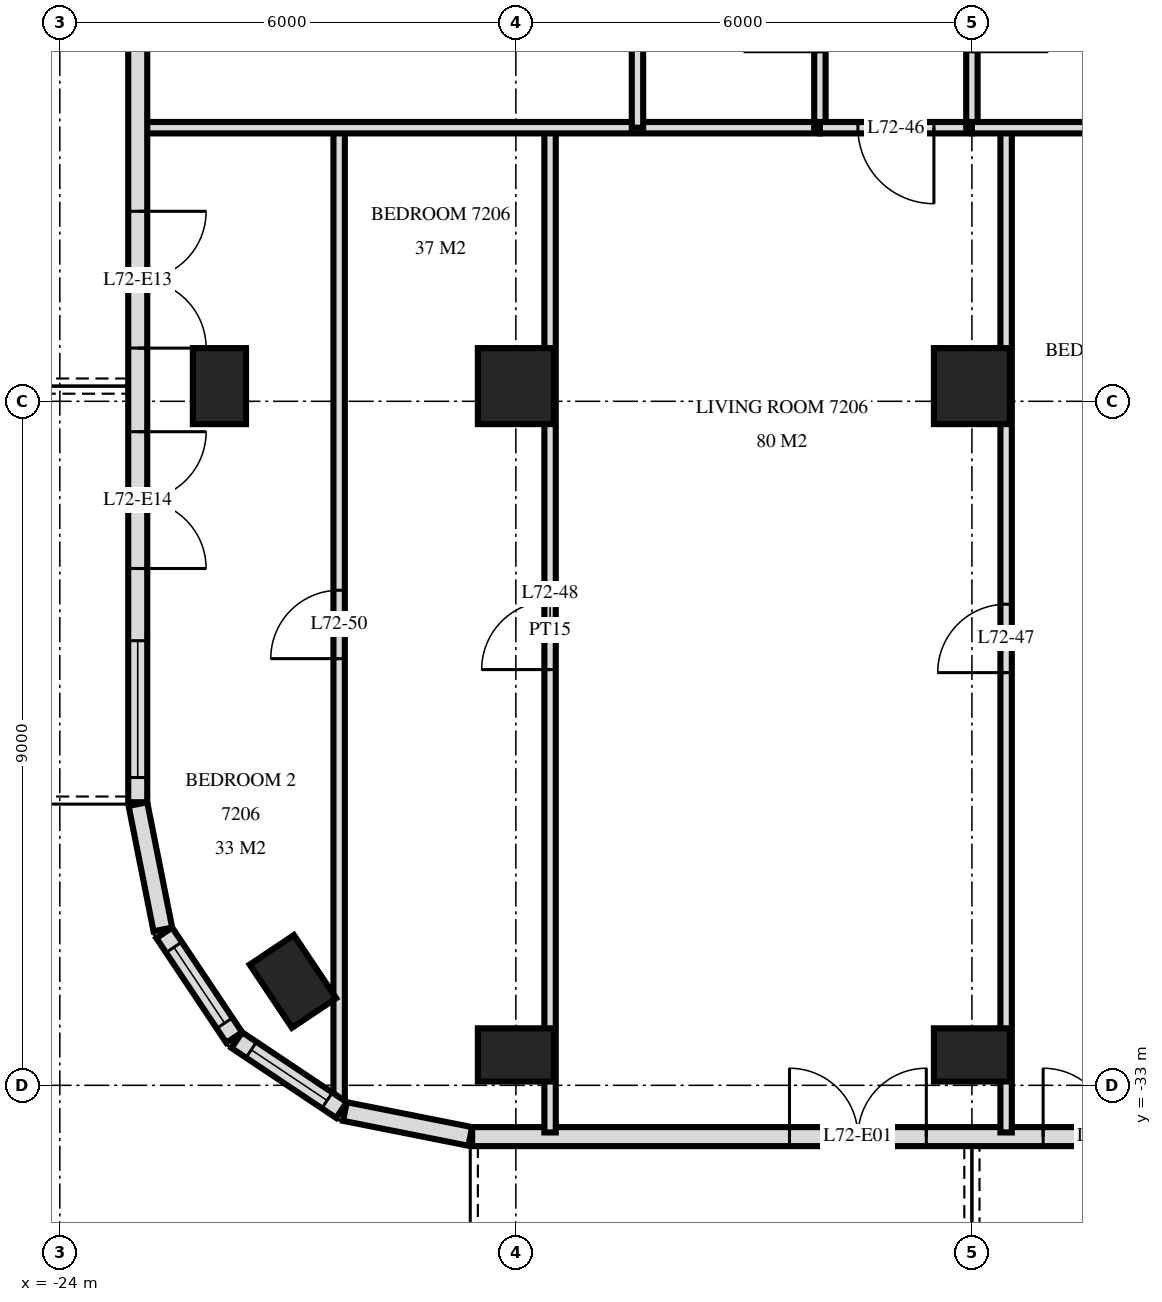
"""IFC4 building model, lengths in metres.
Left out: names, types, materials, properties, quantities, classifications, styles, units other than length and angle.
Written with IfcOpenShell. Run it as: python <this file> out.ifc"""

import sys

from ifc_helpers import new_model, si_unit, direction, frame, frame_2d, origin, origin_2d, place, context, subcontext, project, spatial, rectangle, extrude, element, fill, save


model = new_model("IFC4")
c1 = context("Model", 3, precision=1e-05, world=origin(), true_north=direction((0.0, 1.0)))
c2 = subcontext(c1, "Body", "Model", "MODEL_VIEW")
j1 = project(units=[si_unit("LENGTHUNIT", "METRE"), si_unit("PLANEANGLEUNIT", "RADIAN")], contexts=[c1])
p1 = place(None, origin())
s1 = spatial("IfcSite", under=j1, at=p1, CompositionType="ELEMENT")
p2 = place(p1, origin())
s2 = spatial("IfcBuilding", under=s1, at=p2, CompositionType="ELEMENT")
p3 = place(p2, frame((0.0, 0.0, 273.6)))
s3 = spatial("IfcBuildingStorey", under=s2, at=p3, CompositionType="ELEMENT", Elevation=273.6)
for number, where, z_axis, x_axis in (
    (1, (-21.9, -23.8, 0.0), (0.0, 0.0, 1.0), (0.0, 1.0, 0.0)),
    (2, (-20.933, -31.633, 0.0), (0.0, 0.0, 1.0), (-0.556, 0.831, 0.0)),
    (3, (-18.0, -32.6, 0.0), (0.0, 0.0, 1.0), (1.0, 0.0, 0.0)),
):
    element("IfcColumn", number, at=place(p3, frame(where, z_axis=z_axis, x_axis=x_axis)), inside=s3, PredefinedType="COLUMN", context=c2, shape_type="SweptSolid", body=[
        extrude(rectangle(XDim=1.0, YDim=0.7, at=origin_2d()), origin(), (0.0, 0.0, 1.0), 3.5),
    ])
p4 = place(p3, frame((-18.0, -23.8, 0.0), z_axis=(0.0, 0.0, 1.0), x_axis=(1.0, 0.0, 0.0)))
e4 = element("IfcColumn", 4, at=p4, inside=s3, PredefinedType="COLUMN", context=c2, shape_type="SweptSolid", body=[
    extrude(rectangle(XDim=1.0, YDim=1.0, at=origin_2d()), origin(), (0.0, 0.0, 1.0), 3.5),
])
p5 = place(p3, frame((-12.0, -32.6, 0.0), z_axis=(0.0, 0.0, 1.0), x_axis=(1.0, 0.0, 0.0)))
e5 = element("IfcColumn", 5, at=p5, inside=s3, PredefinedType="COLUMN", context=c2, shape_type="SweptSolid", body=[
    extrude(rectangle(XDim=1.0, YDim=0.7, at=origin_2d()), origin(), (0.0, 0.0, 1.0), 3.5),
])
p6 = place(p3, frame((-12.0, -23.8, 0.0), z_axis=(0.0, 0.0, 1.0), x_axis=(1.0, 0.0, 0.0)))
e6 = element("IfcColumn", 6, at=p6, inside=s3, PredefinedType="COLUMN", context=c2, shape_type="SweptSolid", body=[
    extrude(rectangle(XDim=1.0, YDim=1.0, at=origin_2d()), origin(), (0.0, 0.0, 1.0), 3.5),
])
p7 = place(p3, frame((-22.975, -3.325, 0.0), z_axis=(0.0, 0.0, 1.0), x_axis=(0.0, -1.0, 0.0)))
e7 = element("IfcWall", 7, at=p7, inside=s3, PredefinedType="SOLIDWALL", context=c2, shape_type="SweptSolid", body=[
    extrude(rectangle(XDim=25.951, YDim=0.25, at=frame_2d((12.975, 0.0))), origin(), (0.0, 0.0, 1.0), 3.22),
])
p8 = place(p7, frame((3.225, 0.0, 0.0)))
e8 = element("IfcOpeningElement", 8, at=p8, cuts=e7, PredefinedType="OPENING", context=c2, shape_type="SweptSolid", body=[
    extrude(rectangle(XDim=1.8, YDim=2.4, at=frame_2d((0.9, 1.2))), frame((0.0, 0.135, 0.0), z_axis=(0.0, -1.0, 0.0), x_axis=(1.0, 0.0, 0.0)), (0.0, 0.0, 1.0), 0.27),
])
p9 = place(p7, frame((7.975, 0.0, 0.0)))
e9 = element("IfcOpeningElement", 9, at=p9, cuts=e7, PredefinedType="OPENING", context=c2, shape_type="SweptSolid", body=[
    extrude(rectangle(XDim=1.8, YDim=2.4, at=frame_2d((0.9, 1.2))), frame((0.0, 0.135, 0.0), z_axis=(0.0, -1.0, 0.0), x_axis=(1.0, 0.0, 0.0)), (0.0, 0.0, 1.0), 0.27),
])
p10 = place(p7, frame((12.275, 0.0, 0.9)))
e10 = element("IfcOpeningElement", 10, at=p10, cuts=e7, PredefinedType="OPENING", context=c2, shape_type="SweptSolid", body=[
    extrude(rectangle(XDim=1.2, YDim=1.5, at=frame_2d((0.6, 0.75))), frame((0.0, 0.135, 0.0), z_axis=(0.0, -1.0, 0.0), x_axis=(1.0, 0.0, 0.0)), (0.0, 0.0, 1.0), 0.27),
])
p11 = place(p7, frame((18.175, 0.0, 0.0)))
e11 = element("IfcOpeningElement", 11, at=p11, cuts=e7, PredefinedType="OPENING", context=c2, shape_type="SweptSolid", body=[
    extrude(rectangle(XDim=1.8, YDim=2.4, at=frame_2d((0.9, 1.2))), frame((0.0, 0.135, 0.0), z_axis=(0.0, -1.0, 0.0), x_axis=(1.0, 0.0, 0.0)), (0.0, 0.0, 1.0), 0.27),
])
p12 = place(p7, frame((21.075, 0.0, 0.0)))
e12 = element("IfcOpeningElement", 12, at=p12, cuts=e7, PredefinedType="OPENING", context=c2, shape_type="SweptSolid", body=[
    extrude(rectangle(XDim=1.8, YDim=2.4, at=frame_2d((0.9, 1.2))), frame((0.0, 0.135, 0.0), z_axis=(0.0, -1.0, 0.0), x_axis=(1.0, 0.0, 0.0)), (0.0, 0.0, 1.0), 0.27),
])
p13 = place(p7, frame((23.825, 0.0, 0.9)))
e13 = element("IfcOpeningElement", 13, at=p13, cuts=e7, PredefinedType="OPENING", context=c2, shape_type="SweptSolid", body=[
    extrude(rectangle(XDim=1.8, YDim=1.5, at=frame_2d((0.9, 0.75))), frame((0.0, 0.135, 0.0), z_axis=(0.0, -1.0, 0.0), x_axis=(1.0, 0.0, 0.0)), (0.0, 0.0, 1.0), 0.27),
])
p14 = place(p3, frame((-22.973, -29.3, 0.0), z_axis=(0.0, 0.0, 1.0), x_axis=(0.19513878023, -0.980775640221, 0.0)))
e14 = element("IfcWall", 14, at=p14, inside=s3, PredefinedType="SOLIDWALL", context=c2, shape_type="SweptSolid", body=[
    extrude(rectangle(XDim=1.681, YDim=0.25, at=frame_2d((0.841, 0.0))), origin(), (0.0, 0.0, 1.0), 3.22),
])
p15 = place(p3, frame((-22.626, -30.994, 0.0), z_axis=(0.0, 0.0, 1.0), x_axis=(0.55555029066, -0.831482937015, 0.0)))
e15 = element("IfcWall", 15, at=p15, inside=s3, PredefinedType="SOLIDWALL", context=c2, shape_type="SweptSolid", body=[
    extrude(rectangle(XDim=1.656, YDim=0.25, at=frame_2d((0.828, 0.0))), origin(), (0.0, 0.0, 1.0), 3.22),
])
p16 = place(p15, frame((0.228, 0.0, 0.9)))
e16 = element("IfcOpeningElement", 16, at=p16, cuts=e15, PredefinedType="OPENING", context=c2, shape_type="SweptSolid", body=[
    extrude(rectangle(XDim=1.2, YDim=1.5, at=frame_2d((0.6, 0.75))), frame((0.0, 0.135, 0.0), z_axis=(0.0, -1.0, 0.0), x_axis=(1.0, 0.0, 0.0)), (0.0, 0.0, 1.0), 0.27),
])
p17 = place(p3, frame((-21.671, -32.406, 0.0), z_axis=(0.0, 0.0, 1.0), x_axis=(0.831482937015, -0.55555029066, 0.0)))
e17 = element("IfcWall", 17, at=p17, inside=s3, PredefinedType="SOLIDWALL", context=c2, shape_type="SweptSolid", body=[
    extrude(rectangle(XDim=1.656, YDim=0.25, at=frame_2d((0.828, 0.0))), origin(), (0.0, 0.0, 1.0), 3.22),
])
p18 = place(p17, frame((0.228, 0.0, 0.9)))
e18 = element("IfcOpeningElement", 18, at=p18, cuts=e17, PredefinedType="OPENING", context=c2, shape_type="SweptSolid", body=[
    extrude(rectangle(XDim=1.2, YDim=1.5, at=frame_2d((0.6, 0.75))), frame((0.0, 0.135, 0.0), z_axis=(0.0, -1.0, 0.0), x_axis=(1.0, 0.0, 0.0)), (0.0, 0.0, 1.0), 0.27),
])
p19 = place(p3, frame((-20.249, -33.344, 0.0), z_axis=(0.0, 0.0, 1.0), x_axis=(0.980770110232, -0.195166572128, 0.0)))
e19 = element("IfcWall", 19, at=p19, inside=s3, PredefinedType="SOLIDWALL", context=c2, shape_type="SweptSolid", body=[
    extrude(rectangle(XDim=1.681, YDim=0.25, at=frame_2d((0.841, 0.0))), origin(), (0.0, 0.0, 1.0), 3.22),
])
p20 = place(p3, frame((-18.575, -33.675, 0.0), z_axis=(0.0, 0.0, 1.0), x_axis=(1.0, 0.0, 0.0)))
e20 = element("IfcWall", 20, at=p20, inside=s3, PredefinedType="SOLIDWALL", context=c2, shape_type="SweptSolid", body=[
    extrude(rectangle(XDim=37.151, YDim=0.25, at=frame_2d((18.575, 0.0))), origin(), (0.0, 0.0, 1.0), 3.22),
])
p21 = place(p20, frame((4.175, 0.0, 0.0)))
e21 = element("IfcOpeningElement", 21, at=p21, cuts=e20, PredefinedType="OPENING", context=c2, shape_type="SweptSolid", body=[
    extrude(rectangle(XDim=1.8, YDim=2.4, at=frame_2d((0.9, 1.2))), frame((0.0, 0.135, 0.0), z_axis=(0.0, -1.0, 0.0), x_axis=(1.0, 0.0, 0.0)), (0.0, 0.0, 1.0), 0.27),
])
p22 = place(p20, frame((7.512, 0.0, 0.0)))
e22 = element("IfcOpeningElement", 22, at=p22, cuts=e20, PredefinedType="OPENING", context=c2, shape_type="SweptSolid", body=[
    extrude(rectangle(XDim=1.8, YDim=2.4, at=frame_2d((0.9, 1.2))), frame((0.0, 0.135, 0.0), z_axis=(0.0, -1.0, 0.0), x_axis=(1.0, 0.0, 0.0)), (0.0, 0.0, 1.0), 0.27),
])
p23 = place(p20, frame((10.287, 0.0, 0.9)))
e23 = element("IfcOpeningElement", 23, at=p23, cuts=e20, PredefinedType="OPENING", context=c2, shape_type="SweptSolid", body=[
    extrude(rectangle(XDim=1.8, YDim=1.5, at=frame_2d((0.9, 0.75))), frame((0.0, 0.135, 0.0), z_axis=(0.0, -1.0, 0.0), x_axis=(1.0, 0.0, 0.0)), (0.0, 0.0, 1.0), 0.27),
])
p24 = place(p20, frame((12.875, 0.0, 0.9)))
e24 = element("IfcOpeningElement", 24, at=p24, cuts=e20, PredefinedType="OPENING", context=c2, shape_type="SweptSolid", body=[
    extrude(rectangle(XDim=2.4, YDim=1.5, at=frame_2d((1.2, 0.75))), frame((0.0, 0.135, 0.0), z_axis=(0.0, -1.0, 0.0), x_axis=(1.0, 0.0, 0.0)), (0.0, 0.0, 1.0), 0.27),
])
p25 = place(p20, frame((16.175, 0.0, 0.0)))
e25 = element("IfcOpeningElement", 25, at=p25, cuts=e20, PredefinedType="OPENING", context=c2, shape_type="SweptSolid", body=[
    extrude(rectangle(XDim=1.8, YDim=2.4, at=frame_2d((0.9, 1.2))), frame((0.0, 0.135, 0.0), z_axis=(0.0, -1.0, 0.0), x_axis=(1.0, 0.0, 0.0)), (0.0, 0.0, 1.0), 0.27),
])
p26 = place(p20, frame((19.175, 0.0, 0.0)))
e26 = element("IfcOpeningElement", 26, at=p26, cuts=e20, PredefinedType="OPENING", context=c2, shape_type="SweptSolid", body=[
    extrude(rectangle(XDim=1.8, YDim=2.4, at=frame_2d((0.9, 1.2))), frame((0.0, 0.135, 0.0), z_axis=(0.0, -1.0, 0.0), x_axis=(1.0, 0.0, 0.0)), (0.0, 0.0, 1.0), 0.27),
])
p27 = place(p20, frame((21.875, 0.0, 0.9)))
e27 = element("IfcOpeningElement", 27, at=p27, cuts=e20, PredefinedType="OPENING", context=c2, shape_type="SweptSolid", body=[
    extrude(rectangle(XDim=2.4, YDim=1.5, at=frame_2d((1.2, 0.75))), frame((0.0, 0.135, 0.0), z_axis=(0.0, -1.0, 0.0), x_axis=(1.0, 0.0, 0.0)), (0.0, 0.0, 1.0), 0.27),
])
p28 = place(p20, frame((25.175, 0.0, 0.0)))
e28 = element("IfcOpeningElement", 28, at=p28, cuts=e20, PredefinedType="OPENING", context=c2, shape_type="SweptSolid", body=[
    extrude(rectangle(XDim=1.8, YDim=2.4, at=frame_2d((0.9, 1.2))), frame((0.0, 0.135, 0.0), z_axis=(0.0, -1.0, 0.0), x_axis=(1.0, 0.0, 0.0)), (0.0, 0.0, 1.0), 0.27),
])
p29 = place(p20, frame((27.875, 0.0, 0.9)))
e29 = element("IfcOpeningElement", 29, at=p29, cuts=e20, PredefinedType="OPENING", context=c2, shape_type="SweptSolid", body=[
    extrude(rectangle(XDim=2.4, YDim=1.5, at=frame_2d((1.2, 0.75))), frame((0.0, 0.135, 0.0), z_axis=(0.0, -1.0, 0.0), x_axis=(1.0, 0.0, 0.0)), (0.0, 0.0, 1.0), 0.27),
])
p30 = place(p20, frame((30.95, 0.0, 0.9)))
e30 = element("IfcOpeningElement", 30, at=p30, cuts=e20, PredefinedType="OPENING", context=c2, shape_type="SweptSolid", body=[
    extrude(rectangle(XDim=1.8, YDim=1.5, at=frame_2d((0.9, 0.75))), frame((0.0, 0.135, 0.0), z_axis=(0.0, -1.0, 0.0), x_axis=(1.0, 0.0, 0.0)), (0.0, 0.0, 1.0), 0.27),
])
p31 = place(p20, frame((34.175, 0.0, 0.0)))
e31 = element("IfcOpeningElement", 31, at=p31, cuts=e20, PredefinedType="OPENING", context=c2, shape_type="SweptSolid", body=[
    extrude(rectangle(XDim=1.8, YDim=2.4, at=frame_2d((0.9, 1.2))), frame((0.0, 0.135, 0.0), z_axis=(0.0, -1.0, 0.0), x_axis=(1.0, 0.0, 0.0)), (0.0, 0.0, 1.0), 0.27),
])
p32 = place(p3, frame((-11.55, -33.62, 0.0), z_axis=(0.0, 0.0, 1.0), x_axis=(0.0, 1.0, 0.0)))
e32 = element("IfcWall", 32, at=p32, inside=s3, PredefinedType="PARTITIONING", context=c2, shape_type="SweptSolid", body=[
    extrude(rectangle(XDim=13.22, YDim=0.15, at=frame_2d((6.61, 0.0))), origin(), (0.0, 0.0, 1.0), 3.22),
])
p33 = place(p32, frame((6.05, 0.0, 0.0)))
e33 = element("IfcOpeningElement", 33, at=p33, cuts=e32, PredefinedType="OPENING", context=c2, shape_type="SweptSolid", body=[
    extrude(rectangle(XDim=0.9, YDim=2.1, at=frame_2d((0.45, 1.05))), frame((0.0, 0.085, 0.0), z_axis=(0.0, -1.0, 0.0), x_axis=(1.0, 0.0, 0.0)), (0.0, 0.0, 1.0), 0.17),
])
p34 = place(p3, frame((-12.0, -20.4, 0.0), z_axis=(0.0, 0.0, 1.0), x_axis=(0.0, 1.0, 0.0)))
e34 = element("IfcWall", 34, at=p34, inside=s3, PredefinedType="PARTITIONING", context=c2, shape_type="SweptSolid", body=[
    extrude(rectangle(XDim=3.0, YDim=0.15, at=frame_2d((1.5, 0.0))), origin(), (0.0, 0.0, 1.0), 3.22),
])
p35 = place(p34, frame((1.0, 0.0, 0.0)))
e35 = element("IfcOpeningElement", 35, at=p35, cuts=e34, PredefinedType="OPENING", context=c2, shape_type="SweptSolid", body=[
    extrude(rectangle(XDim=1.0, YDim=2.1, at=frame_2d((0.5, 1.05))), frame((0.0, 0.085, 0.0), z_axis=(0.0, -1.0, 0.0), x_axis=(1.0, 0.0, 0.0)), (0.0, 0.0, 1.0), 0.17),
])
p36 = place(p3, frame((-14.0, -20.4, 0.0), z_axis=(0.0, 0.0, 1.0), x_axis=(0.0, 1.0, 0.0)))
e36 = element("IfcWall", 36, at=p36, inside=s3, PredefinedType="PARTITIONING", context=c2, shape_type="SweptSolid", body=[
    extrude(rectangle(XDim=3.0, YDim=0.15, at=frame_2d((1.5, 0.0))), origin(), (0.0, 0.0, 1.0), 3.22),
])
p37 = place(p36, frame((1.0, 0.0, 0.0)))
e37 = element("IfcOpeningElement", 37, at=p37, cuts=e36, PredefinedType="OPENING", context=c2, shape_type="SweptSolid", body=[
    extrude(rectangle(XDim=1.0, YDim=2.1, at=frame_2d((0.5, 1.05))), frame((0.0, 0.085, 0.0), z_axis=(0.0, -1.0, 0.0), x_axis=(1.0, 0.0, 0.0)), (0.0, 0.0, 1.0), 0.17),
])
p38 = place(p3, frame((-16.4, -20.4, 0.0), z_axis=(0.0, 0.0, 1.0), x_axis=(0.0, 1.0, 0.0)))
e38 = element("IfcWall", 38, at=p38, inside=s3, PredefinedType="PARTITIONING", context=c2, shape_type="SweptSolid", body=[
    extrude(rectangle(XDim=3.0, YDim=0.15, at=frame_2d((1.5, 0.0))), origin(), (0.0, 0.0, 1.0), 3.22),
])
p39 = place(p3, frame((-17.55, -33.62, 0.0), z_axis=(0.0, 0.0, 1.0), x_axis=(0.0, 1.0, 0.0)))
e39 = element("IfcWall", 39, at=p39, inside=s3, PredefinedType="PARTITIONING", context=c2, shape_type="SweptSolid", body=[
    extrude(rectangle(XDim=13.22, YDim=0.15, at=frame_2d((6.61, 0.0))), origin(), (0.0, 0.0, 1.0), 3.22),
])
p40 = place(p39, frame((6.09, 0.0, 0.0)))
e40 = element("IfcOpeningElement", 40, at=p40, cuts=e39, PredefinedType="OPENING", context=c2, shape_type="SweptSolid", body=[
    extrude(rectangle(XDim=0.9, YDim=2.1, at=frame_2d((0.45, 1.05))), frame((0.0, 0.085, 0.0), z_axis=(0.0, -1.0, 0.0), x_axis=(1.0, 0.0, 0.0)), (0.0, 0.0, 1.0), 0.17),
])
p41 = place(p3, frame((-20.325, -33.239, 0.0), z_axis=(0.0, 0.0, 1.0), x_axis=(0.0, 1.0, 0.0)))
e41 = element("IfcWall", 41, at=p41, inside=s3, PredefinedType="PARTITIONING", context=c2, shape_type="SweptSolid", body=[
    extrude(rectangle(XDim=12.839, YDim=0.15, at=frame_2d((6.419, 0.0))), origin(), (0.0, 0.0, 1.0), 3.22),
])
p42 = place(p41, frame((5.853, 0.0, 0.0)))
e42 = element("IfcOpeningElement", 42, at=p42, cuts=e41, PredefinedType="OPENING", context=c2, shape_type="SweptSolid", body=[
    extrude(rectangle(XDim=0.9, YDim=2.1, at=frame_2d((0.45, 1.05))), frame((0.0, 0.085, 0.0), z_axis=(0.0, -1.0, 0.0), x_axis=(1.0, 0.0, 0.0)), (0.0, 0.0, 1.0), 0.17),
])
p43 = place(p3, frame((-14.0, -20.4, 0.0), z_axis=(0.0, 0.0, 1.0), x_axis=(1.0, 0.0, 0.0)))
e43 = element("IfcWall", 43, at=p43, inside=s3, PredefinedType="PARTITIONING", context=c2, shape_type="SweptSolid", body=[
    extrude(rectangle(XDim=2.0, YDim=0.15, at=frame_2d((1.0, 0.0))), origin(), (0.0, 0.0, 1.0), 3.22),
])
p44 = place(p43, frame((0.5, 0.0, 0.0)))
e44 = element("IfcOpeningElement", 44, at=p44, cuts=e43, PredefinedType="OPENING", context=c2, shape_type="SweptSolid", body=[
    extrude(rectangle(XDim=1.0, YDim=2.1, at=frame_2d((0.5, 1.05))), frame((0.0, 0.085, 0.0), z_axis=(0.0, -1.0, 0.0), x_axis=(1.0, 0.0, 0.0)), (0.0, 0.0, 1.0), 0.17),
])
p45 = place(p3, frame((-22.92, -20.4, 0.0), z_axis=(0.0, 0.0, 1.0), x_axis=(1.0, 0.0, 0.0)))
e45 = element("IfcWall", 45, at=p45, inside=s3, PredefinedType="PARTITIONING", context=c2, shape_type="SweptSolid", body=[
    extrude(rectangle(XDim=8.92, YDim=0.15, at=frame_2d((4.46, 0.0))), origin(), (0.0, 0.0, 1.0), 3.22),
])
p46 = place(p3, frame((-12.0, -20.4, 0.0), z_axis=(0.0, 0.0, 1.0), x_axis=(1.0, 0.0, 0.0)))
e46 = element("IfcWall", 46, at=p46, inside=s3, PredefinedType="PARTITIONING", context=c2, shape_type="SweptSolid", body=[
    extrude(rectangle(XDim=6.0, YDim=0.15, at=frame_2d((3.0, 0.0))), origin(), (0.0, 0.0, 1.0), 3.22),
])
p47 = place(p46, frame((4.4, 0.0, 0.0)))
e47 = element("IfcOpeningElement", 47, at=p47, cuts=e46, PredefinedType="OPENING", context=c2, shape_type="SweptSolid", body=[
    extrude(rectangle(XDim=0.8, YDim=2.1, at=frame_2d((0.4, 1.05))), frame((0.0, 0.085, 0.0), z_axis=(0.0, -1.0, 0.0), x_axis=(1.0, 0.0, 0.0)), (0.0, 0.0, 1.0), 0.17),
])
p48 = place(p16, origin())
e48 = element("IfcWindow", 48, at=p48, inside=s3, PartitioningType="SINGLE_PANEL", PredefinedType="WINDOW", context=c2, shape_type="SweptSolid", body=[
    extrude(rectangle(XDim=1.2, YDim=1.5, at=frame_2d((0.6, 0.75))), frame((0.0, 0.03, 0.0), z_axis=(0.0, -1.0, 0.0), x_axis=(1.0, 0.0, 0.0)), (0.0, 0.0, 1.0), 0.06),
])
fill(e16, e48)
p49 = place(p18, origin())
e49 = element("IfcWindow", 49, at=p49, inside=s3, PartitioningType="SINGLE_PANEL", PredefinedType="WINDOW", context=c2, shape_type="SweptSolid", body=[
    extrude(rectangle(XDim=1.2, YDim=1.5, at=frame_2d((0.6, 0.75))), frame((0.0, 0.03, 0.0), z_axis=(0.0, -1.0, 0.0), x_axis=(1.0, 0.0, 0.0)), (0.0, 0.0, 1.0), 0.06),
])
fill(e18, e49)
p50 = place(p21, origin())
e50 = element("IfcDoor", 50, at=p50, inside=s3, OperationType="DOUBLE_DOOR_SINGLE_SWING", PredefinedType="DOOR", context=c2, shape_type="SweptSolid", body=[
    extrude(rectangle(XDim=1.8, YDim=2.4, at=frame_2d((0.9, 1.2))), frame((0.0, 0.025, 0.0), z_axis=(0.0, -1.0, 0.0), x_axis=(1.0, 0.0, 0.0)), (0.0, 0.0, 1.0), 0.05),
])
fill(e21, e50)
p51 = place(p22, origin())
e51 = element("IfcDoor", 51, at=p51, inside=s3, OperationType="DOUBLE_DOOR_SINGLE_SWING", PredefinedType="DOOR", context=c2, shape_type="SweptSolid", body=[
    extrude(rectangle(XDim=1.8, YDim=2.4, at=frame_2d((0.9, 1.2))), frame((0.0, 0.025, 0.0), z_axis=(0.0, -1.0, 0.0), x_axis=(1.0, 0.0, 0.0)), (0.0, 0.0, 1.0), 0.05),
])
fill(e22, e51)
p52 = place(p11, origin())
e52 = element("IfcDoor", 52, at=p52, inside=s3, OperationType="DOUBLE_DOOR_SINGLE_SWING", PredefinedType="DOOR", context=c2, shape_type="SweptSolid", body=[
    extrude(rectangle(XDim=1.8, YDim=2.4, at=frame_2d((0.9, 1.2))), frame((0.0, 0.025, 0.0), z_axis=(0.0, -1.0, 0.0), x_axis=(1.0, 0.0, 0.0)), (0.0, 0.0, 1.0), 0.05),
])
fill(e11, e52)
p53 = place(p12, origin())
e53 = element("IfcDoor", 53, at=p53, inside=s3, OperationType="DOUBLE_DOOR_SINGLE_SWING", PredefinedType="DOOR", context=c2, shape_type="SweptSolid", body=[
    extrude(rectangle(XDim=1.8, YDim=2.4, at=frame_2d((0.9, 1.2))), frame((0.0, 0.025, 0.0), z_axis=(0.0, -1.0, 0.0), x_axis=(1.0, 0.0, 0.0)), (0.0, 0.0, 1.0), 0.05),
])
fill(e12, e53)
p54 = place(p13, origin())
e54 = element("IfcWindow", 54, at=p54, inside=s3, PartitioningType="SINGLE_PANEL", PredefinedType="WINDOW", context=c2, shape_type="SweptSolid", body=[
    extrude(rectangle(XDim=1.8, YDim=1.5, at=frame_2d((0.9, 0.75))), frame((0.0, 0.03, 0.0), z_axis=(0.0, -1.0, 0.0), x_axis=(1.0, 0.0, 0.0)), (0.0, 0.0, 1.0), 0.06),
])
fill(e13, e54)
p55 = place(p44, frame((0.5, 0.0, 0.0), z_axis=(0.0, 0.0, 1.0), x_axis=(-1.0, 0.0, 0.0)))
e55 = element("IfcDoor", 55, at=p55, inside=s3, OperationType="SINGLE_SWING_RIGHT", PredefinedType="DOOR", context=c2, shape_type="SweptSolid", body=[
    extrude(rectangle(XDim=1.0, YDim=2.1, at=frame_2d((0.0, 1.05))), frame((0.0, -0.025, 0.0), z_axis=(0.0, 1.0, 0.0), x_axis=(-1.0, 0.0, 0.0)), (0.0, 0.0, 1.0), 0.05),
])
fill(e44, e55)
p56 = place(p33, origin())
e56 = element("IfcDoor", 56, at=p56, inside=s3, OperationType="SINGLE_SWING_RIGHT", PredefinedType="DOOR", context=c2, shape_type="SweptSolid", body=[
    extrude(rectangle(XDim=0.9, YDim=2.1, at=frame_2d((0.45, 1.05))), frame((0.0, 0.025, 0.0), z_axis=(0.0, -1.0, 0.0), x_axis=(1.0, 0.0, 0.0)), (0.0, 0.0, 1.0), 0.05),
])
fill(e33, e56)
p57 = place(p40, origin())
e57 = element("IfcDoor", 57, at=p57, inside=s3, OperationType="SINGLE_SWING_RIGHT", PredefinedType="DOOR", context=c2, shape_type="SweptSolid", body=[
    extrude(rectangle(XDim=0.9, YDim=2.1, at=frame_2d((0.45, 1.05))), frame((0.0, 0.025, 0.0), z_axis=(0.0, -1.0, 0.0), x_axis=(1.0, 0.0, 0.0)), (0.0, 0.0, 1.0), 0.05),
])
fill(e40, e57)
p58 = place(p42, origin())
e58 = element("IfcDoor", 58, at=p58, inside=s3, OperationType="SINGLE_SWING_RIGHT", PredefinedType="DOOR", context=c2, shape_type="SweptSolid", body=[
    extrude(rectangle(XDim=0.9, YDim=2.1, at=frame_2d((0.45, 1.05))), frame((0.0, 0.025, 0.0), z_axis=(0.0, -1.0, 0.0), x_axis=(1.0, 0.0, 0.0)), (0.0, 0.0, 1.0), 0.05),
])
fill(e42, e58)
save(model, sys.argv[1])
